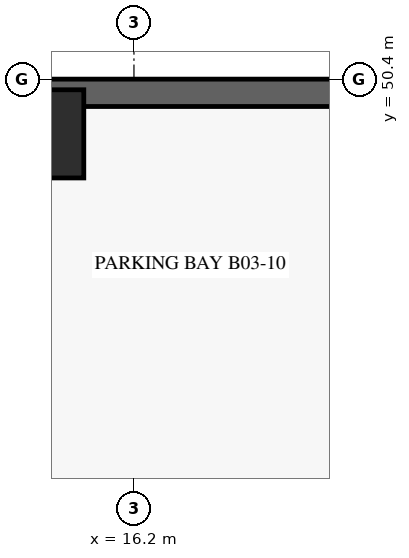
"""IFC4 building model, lengths in metres.
Left out: names, types, materials, properties, quantities, classifications, styles, units other than length and angle.
Written with IfcOpenShell. Run it as: python <this file> out.ifc"""

import sys

from ifc_helpers import new_model, si_unit, direction, frame, frame_2d, origin, origin_2d, place, context, subcontext, project, spatial, rectangle, extrude, source, transform, mapped, element, save


model = new_model("IFC4")
c1 = context("Model", 3, precision=1e-05, world=origin(), true_north=direction((0.0, 1.0)))
c2 = subcontext(c1, "Body", "Model", "MODEL_VIEW")
j1 = project(units=[si_unit("LENGTHUNIT", "METRE"), si_unit("PLANEANGLEUNIT", "RADIAN")], contexts=[c1])
p1 = place(None, origin())
s1 = spatial("IfcSite", under=j1, at=p1, CompositionType="ELEMENT")
p2 = place(p1, origin())
s2 = spatial("IfcBuilding", under=s1, at=p2, CompositionType="ELEMENT")
p3 = place(p2, frame((0.0, 0.0, -10.8)))
s3 = spatial("IfcBuildingStorey", under=s2, at=p3, CompositionType="ELEMENT", Elevation=-10.8)
p4 = place(p3, frame((64.575, 50.175, 0.0), z_axis=(0.0, 0.0, 1.0), x_axis=(-1.0, 0.0, 0.0)))
e1 = element("IfcWall", 1, at=p4, inside=s3, PredefinedType="USERDEFINED", context=c2, shape_type="SweptSolid", body=[
    extrude(rectangle(XDim=64.35, YDim=0.45, at=frame_2d((32.175, 0.0))), origin(), (0.0, 0.0, 1.0), 3.238),
])
m1 = source(origin(), c2, "Body", "SweptSolid", [
    extrude(rectangle(XDim=1.45, YDim=1.45, at=origin_2d()), origin(), (0.0, 0.0, 1.0), 3.24),
])
p5 = place(p3, frame((14.65, 49.5, 0.0), z_axis=(0.0, 0.0, 1.0), x_axis=(1.0, 0.0, 0.0)))
e2 = element("IfcColumn", 2, at=p5, inside=s3, PredefinedType="COLUMN", context=c2, shape_type="MappedRepresentation", body=[
    mapped(m1, transform((0.0, 0.0, 0.0), scale=1.0)),
])
save(model, sys.argv[1])
